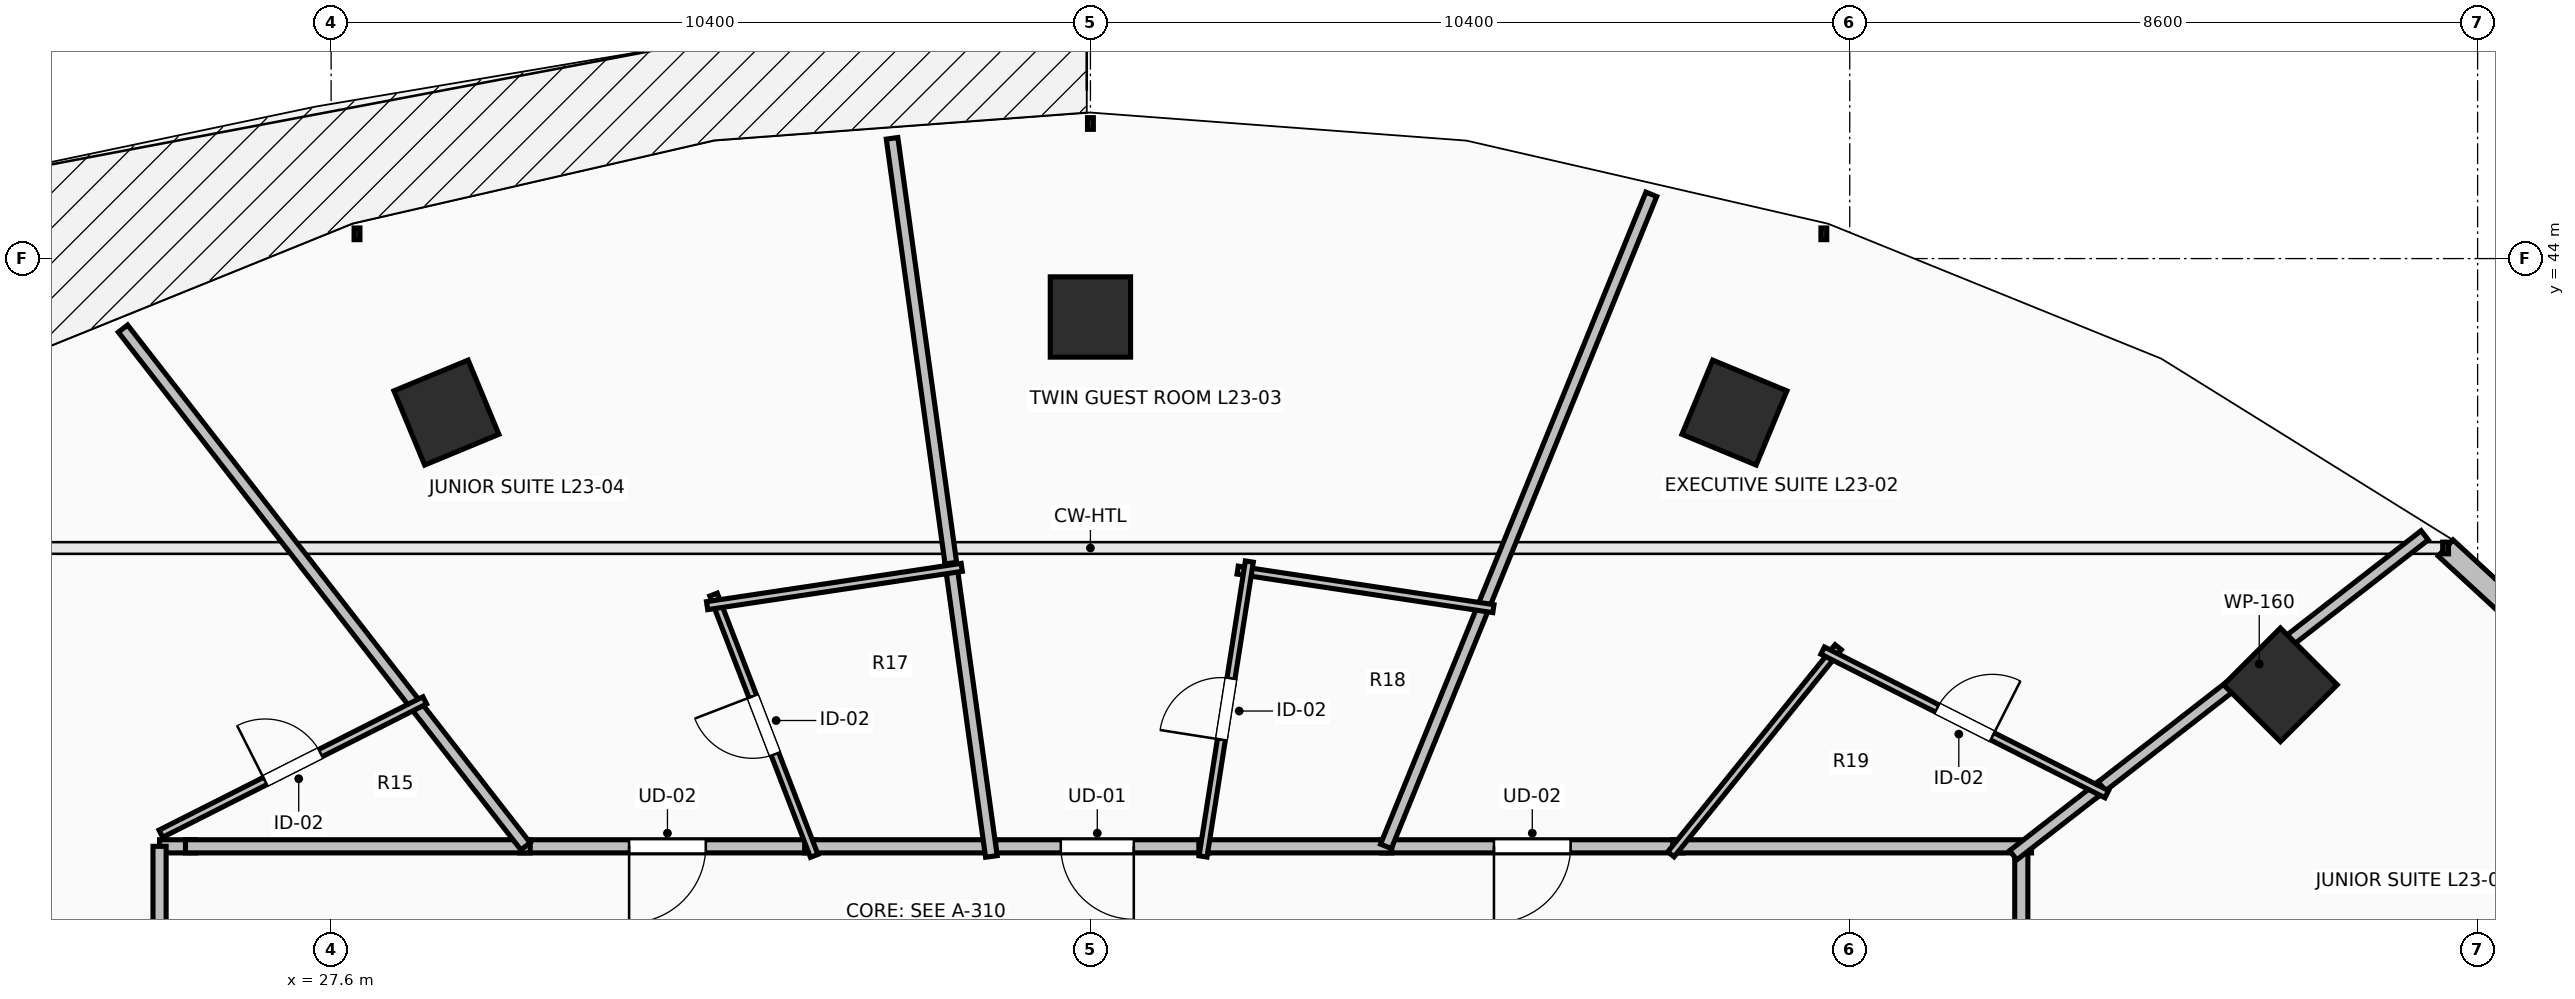
"""IFC4 building model, lengths in metres.
Left out: names, types, materials, properties, quantities, classifications, styles, units other than length and angle.
Written with IfcOpenShell. Run it as: python <this file> out.ifc"""

import sys

from ifc_helpers import new_model, si_unit, direction, frame, frame_2d, origin, origin_2d, place, context, subcontext, project, spatial, rectangle, extrude, element, fill, save


model = new_model("IFC4")
c1 = context("Model", 3, precision=1e-05, world=origin(), true_north=direction((0.0, 1.0)))
c2 = subcontext(c1, "Body", "Model", "MODEL_VIEW")
j1 = project(units=[si_unit("LENGTHUNIT", "METRE"), si_unit("PLANEANGLEUNIT", "RADIAN")], contexts=[c1])
p1 = place(None, origin())
s1 = spatial("IfcSite", under=j1, at=p1, CompositionType="ELEMENT")
p2 = place(p1, origin())
s2 = spatial("IfcBuilding", under=s1, at=p2, CompositionType="ELEMENT")
p3 = place(p2, frame((0.0, 0.0, 89.3)))
s3 = spatial("IfcBuildingStorey", under=s2, at=p3, CompositionType="ELEMENT", Elevation=89.3)
for number, where, z_axis, x_axis in (
    (1, (54.299, 38.162, 0.0), (0.0, 0.0, 1.0), (0.707, 0.707, 0.0)),
    (2, (46.821, 41.891, 0.0), (0.0, 0.0, 1.0), (0.383, 0.924, 0.0)),
    (3, (38.0, 43.2, 0.0), (0.0, 0.0, 1.0), (0.0, 1.0, 0.0)),
    (4, (29.179, 41.891, 0.0), (0.0, 0.0, 1.0), (-0.383, 0.924, 0.0)),
):
    element("IfcColumn", number, at=place(p3, frame(where, z_axis=z_axis, x_axis=x_axis)), inside=s3, PredefinedType="COLUMN", context=c2, shape_type="SweptSolid", body=[
        extrude(rectangle(XDim=1.1, YDim=1.1, at=origin_2d()), origin(), (0.0, 0.0, 1.0), 3.5),
    ])
p4 = place(p3, frame((59.826, 37.028, 0.0), z_axis=(0.0, 0.0, 1.0), x_axis=(-0.735416718093, 0.677615119924, 0.0)))
e5 = element("IfcWall", 5, at=p4, inside=s3, PredefinedType="STANDARD", context=c2, shape_type="SweptSolid", body=[
    extrude(rectangle(XDim=4.439, YDim=0.3, at=frame_2d((2.22, 0.0))), origin(), (0.0, 0.0, 1.0), 3.24),
])
p5 = place(p4, frame((1.32, 0.0, 0.85)))
e6 = element("IfcOpeningElement", 6, at=p5, cuts=e5, PredefinedType="OPENING", context=c2, shape_type="SweptSolid", body=[
    extrude(rectangle(XDim=1.8, YDim=2.19, at=frame_2d((0.9, 1.095))), frame((0.0, 0.165, 0.0), z_axis=(0.0, -1.0, 0.0), x_axis=(1.0, 0.0, 0.0)), (0.0, 0.0, 1.0), 0.33),
])
p6 = place(p3, frame((50.75, 30.853, 0.0), z_axis=(0.0, 0.0, 1.0), x_axis=(0.0, 1.0, 0.0)))
e7 = element("IfcWall", 7, at=p6, inside=s3, PredefinedType="PARTITIONING", context=c2, shape_type="SweptSolid", body=[
    extrude(rectangle(XDim=5.097, YDim=0.18, at=frame_2d((2.548, 0.0))), origin(), (0.0, 0.0, 1.0), 2.432),
])
p7 = place(p6, frame((2.023, 0.0, 0.0)))
e8 = element("IfcOpeningElement", 8, at=p7, cuts=e7, PredefinedType="OPENING", context=c2, shape_type="SweptSolid", body=[
    extrude(rectangle(XDim=1.05, YDim=2.2, at=frame_2d((0.525, 1.1))), frame((0.0, 0.105, 0.0), z_axis=(0.0, -1.0, 0.0), x_axis=(1.0, 0.0, 0.0)), (0.0, 0.0, 1.0), 0.21),
])
p8 = place(p3, frame((46.116, 35.95, 0.0), z_axis=(0.0, 0.0, 1.0), x_axis=(-1.0, 0.0, 0.0)))
e9 = element("IfcWall", 9, at=p8, inside=s3, PredefinedType="PARTITIONING", context=c2, shape_type="SweptSolid", body=[
    extrude(rectangle(XDim=4.128, YDim=0.18, at=frame_2d((2.064, 0.0))), origin(), (0.0, 0.0, 1.0), 2.972),
])
p9 = place(p8, frame((1.539, 0.0, 0.0)))
e10 = element("IfcOpeningElement", 10, at=p9, cuts=e9, PredefinedType="OPENING", context=c2, shape_type="SweptSolid", body=[
    extrude(rectangle(XDim=1.05, YDim=2.2, at=frame_2d((0.525, 1.1))), frame((0.0, 0.105, 0.0), z_axis=(0.0, -1.0, 0.0), x_axis=(1.0, 0.0, 0.0)), (0.0, 0.0, 1.0), 0.21),
])
p10 = place(p3, frame((50.89, 35.95, 0.0), z_axis=(0.0, 0.0, 1.0), x_axis=(-1.0, 0.0, 0.0)))
e11 = element("IfcWall", 11, at=p10, inside=s3, PredefinedType="PARTITIONING", context=c2, shape_type="SweptSolid", body=[
    extrude(rectangle(XDim=4.914, YDim=0.18, at=frame_2d((2.457, 0.0))), origin(), (0.0, 0.0, 1.0), 2.432),
])
p11 = place(p3, frame((39.625, 35.95, 0.0), z_axis=(0.0, 0.0, 1.0), x_axis=(-1.0, 0.0, 0.0)))
e12 = element("IfcWall", 12, at=p11, inside=s3, PredefinedType="PARTITIONING", context=c2, shape_type="SweptSolid", body=[
    extrude(rectangle(XDim=3.062, YDim=0.18, at=frame_2d((1.531, 0.0))), origin(), (0.0, 0.0, 1.0), 2.972),
])
p12 = place(p11, frame((1.031, 0.0, 0.0)))
e13 = element("IfcOpeningElement", 13, at=p12, cuts=e12, PredefinedType="OPENING", context=c2, shape_type="SweptSolid", body=[
    extrude(rectangle(XDim=1.0, YDim=2.15, at=frame_2d((0.5, 1.075))), frame((0.0, 0.105, 0.0), z_axis=(0.0, -1.0, 0.0), x_axis=(1.0, 0.0, 0.0)), (0.0, 0.0, 1.0), 0.21),
])
p13 = place(p3, frame((42.128, 35.95, 0.0), z_axis=(0.0, 0.0, 1.0), x_axis=(-1.0, 0.0, 0.0)))
e14 = element("IfcWall", 14, at=p13, inside=s3, PredefinedType="PARTITIONING", context=c2, shape_type="SweptSolid", body=[
    extrude(rectangle(XDim=2.643, YDim=0.18, at=frame_2d((1.321, 0.0))), origin(), (0.0, 0.0, 1.0), 2.972),
])
p14 = place(p3, frame((34.226, 35.95, 0.0), z_axis=(0.0, 0.0, 1.0), x_axis=(-1.0, 0.0, 0.0)))
e15 = element("IfcWall", 15, at=p14, inside=s3, PredefinedType="PARTITIONING", context=c2, shape_type="SweptSolid", body=[
    extrude(rectangle(XDim=4.039, YDim=0.18, at=frame_2d((2.02, 0.0))), origin(), (0.0, 0.0, 1.0), 2.432),
])
p15 = place(p14, frame((1.494, 0.0, 0.0)))
e16 = element("IfcOpeningElement", 16, at=p15, cuts=e15, PredefinedType="OPENING", context=c2, shape_type="SweptSolid", body=[
    extrude(rectangle(XDim=1.05, YDim=2.2, at=frame_2d((0.525, 1.1))), frame((0.0, 0.105, 0.0), z_axis=(0.0, -1.0, 0.0), x_axis=(1.0, 0.0, 0.0)), (0.0, 0.0, 1.0), 0.21),
])
p16 = place(p3, frame((36.703, 35.95, 0.0), z_axis=(0.0, 0.0, 1.0), x_axis=(-1.0, 0.0, 0.0)))
e17 = element("IfcWall", 17, at=p16, inside=s3, PredefinedType="PARTITIONING", context=c2, shape_type="SweptSolid", body=[
    extrude(rectangle(XDim=2.617, YDim=0.18, at=frame_2d((1.309, 0.0))), origin(), (0.0, 0.0, 1.0), 2.972),
])
p17 = place(p3, frame((25.745, 35.95, 0.0), z_axis=(0.0, 0.0, 1.0), x_axis=(-1.0, 0.0, 0.0)))
e18 = element("IfcWall", 18, at=p17, inside=s3, PredefinedType="PARTITIONING", context=c2, shape_type="SweptSolid", body=[
    extrude(rectangle(XDim=0.495, YDim=0.18, at=frame_2d((0.248, 0.0))), origin(), (0.0, 0.0, 1.0), 3.24),
])
p18 = place(p3, frame((25.25, 35.95, 0.0), z_axis=(0.0, 0.0, 1.0), x_axis=(0.0, -1.0, 0.0)))
e19 = element("IfcWall", 19, at=p18, inside=s3, PredefinedType="PARTITIONING", context=c2, shape_type="SweptSolid", body=[
    extrude(rectangle(XDim=4.822, YDim=0.18, at=frame_2d((2.411, 0.0))), origin(), (0.0, 0.0, 1.0), 2.432),
])
p19 = place(p18, frame((1.886, 0.0, 0.0)))
e20 = element("IfcOpeningElement", 20, at=p19, cuts=e19, PredefinedType="OPENING", context=c2, shape_type="SweptSolid", body=[
    extrude(rectangle(XDim=1.05, YDim=2.2, at=frame_2d((0.525, 1.1))), frame((0.0, 0.105, 0.0), z_axis=(0.0, -1.0, 0.0), x_axis=(1.0, 0.0, 0.0)), (0.0, 0.0, 1.0), 0.21),
])
p20 = place(p3, frame((30.327, 35.95, 0.0), z_axis=(0.0, 0.0, 1.0), x_axis=(-1.0, 0.0, 0.0)))
e21 = element("IfcWall", 21, at=p20, inside=s3, PredefinedType="PARTITIONING", context=c2, shape_type="SweptSolid", body=[
    extrude(rectangle(XDim=4.722, YDim=0.18, at=frame_2d((2.361, 0.0))), origin(), (0.0, 0.0, 1.0), 2.432),
])
p21 = place(p3, frame((56.275, 40.21, 0.0), z_axis=(0.0, 0.0, 1.0), x_axis=(-0.78943235806, -0.613837561614, 0.0)))
e22 = element("IfcWall", 22, at=p21, inside=s3, PredefinedType="PARTITIONING", context=c2, shape_type="SweptSolid", body=[
    extrude(rectangle(XDim=5.741, YDim=0.16, at=frame_2d((2.87, 0.0))), origin(), (0.0, 0.0, 1.0), 2.677),
])
p22 = place(p3, frame((51.854, 36.772, 0.0), z_axis=(0.0, 0.0, 1.0), x_axis=(-0.789420593357, -0.613852691436, 0.0)))
e23 = element("IfcWall", 23, at=p22, inside=s3, PredefinedType="PARTITIONING", context=c2, shape_type="SweptSolid", body=[
    extrude(rectangle(XDim=1.538, YDim=0.16, at=frame_2d((0.769, 0.0))), origin(), (0.0, 0.0, 1.0), 2.922),
])
p23 = place(p3, frame((45.951, 35.841, 0.0), z_axis=(0.0, 0.0, 1.0), x_axis=(0.628411924203, 0.77788074505, 0.0)))
e24 = element("IfcWall", 24, at=p23, inside=s3, PredefinedType="PARTITIONING", context=c2, shape_type="SweptSolid", body=[
    extrude(rectangle(XDim=3.646, YDim=0.11, at=frame_2d((1.823, 0.0))), origin(), (0.0, 0.0, 1.0), 2.432),
])
p24 = place(p3, frame((48.029, 38.631, 0.0), z_axis=(0.0, 0.0, 1.0), x_axis=(0.892459125519, -0.451128262558, 0.0)))
e25 = element("IfcWall", 25, at=p24, inside=s3, PredefinedType="PARTITIONING", context=c2, shape_type="SweptSolid", body=[
    extrude(rectangle(XDim=4.361, YDim=0.11, at=frame_2d((2.18, 0.0))), origin(), (0.0, 0.0, 1.0), 3.24),
])
p25 = place(p24, frame((1.755, 0.0, 0.0)))
e26 = element("IfcOpeningElement", 26, at=p25, cuts=e25, PredefinedType="OPENING", context=c2, shape_type="SweptSolid", body=[
    extrude(rectangle(XDim=0.85, YDim=2.1, at=frame_2d((0.425, 1.05))), frame((0.0, 0.07, 0.0), z_axis=(0.0, -1.0, 0.0), x_axis=(1.0, 0.0, 0.0)), (0.0, 0.0, 1.0), 0.14),
])
p26 = place(p3, frame((45.682, 44.88, 0.0), z_axis=(0.0, 0.0, 1.0), x_axis=(-0.376911553655, -0.9262492541, 0.0)))
e27 = element("IfcWall", 27, at=p26, inside=s3, PredefinedType="PARTITIONING", context=c2, shape_type="SweptSolid", body=[
    extrude(rectangle(XDim=9.641, YDim=0.16, at=frame_2d((4.82, 0.0))), origin(), (0.0, 0.0, 1.0), 2.677),
])
p27 = place(p3, frame((40.017, 39.733, 0.0), z_axis=(0.0, 0.0, 1.0), x_axis=(0.988835521732, -0.149011110196, 0.0)))
e28 = element("IfcWall", 28, at=p27, inside=s3, PredefinedType="PARTITIONING", context=c2, shape_type="SweptSolid", body=[
    extrude(rectangle(XDim=3.542, YDim=0.11, at=frame_2d((1.771, 0.0))), origin(), (0.0, 0.0, 1.0), 3.24),
])
p28 = place(p3, frame((39.542, 35.812, 0.0), z_axis=(0.0, 0.0, 1.0), x_axis=(0.155211191462, 0.98788131172, 0.0)))
e29 = element("IfcWall", 29, at=p28, inside=s3, PredefinedType="PARTITIONING", context=c2, shape_type="SweptSolid", body=[
    extrude(rectangle(XDim=4.088, YDim=0.11, at=frame_2d((2.044, 0.0))), origin(), (0.0, 0.0, 1.0), 2.922),
])
p29 = place(p28, frame((1.619, 0.0, 0.0)))
e30 = element("IfcOpeningElement", 30, at=p29, cuts=e29, PredefinedType="OPENING", context=c2, shape_type="SweptSolid", body=[
    extrude(rectangle(XDim=0.85, YDim=2.1, at=frame_2d((0.425, 1.05))), frame((0.0, 0.07, 0.0), z_axis=(0.0, -1.0, 0.0), x_axis=(1.0, 0.0, 0.0)), (0.0, 0.0, 1.0), 0.14),
])
p30 = place(p3, frame((35.283, 45.647, 0.0), z_axis=(0.0, 0.0, 1.0), x_axis=(0.137015172239, -0.990568948926, 0.0)))
e31 = element("IfcWall", 31, at=p30, inside=s3, PredefinedType="PARTITIONING", context=c2, shape_type="SweptSolid", body=[
    extrude(rectangle(XDim=6.014, YDim=0.16, at=frame_2d((3.007, 0.0))), origin(), (0.0, 0.0, 1.0), 2.432),
])
p31 = place(p3, frame((36.087, 39.829, 0.0), z_axis=(0.0, 0.0, 1.0), x_axis=(0.137071274589, -0.990561187248, 0.0)))
e32 = element("IfcWall", 32, at=p31, inside=s3, PredefinedType="PARTITIONING", context=c2, shape_type="SweptSolid", body=[
    extrude(rectangle(XDim=4.056, YDim=0.16, at=frame_2d((2.028, 0.0))), origin(), (0.0, 0.0, 1.0), 2.922),
])
p32 = place(p3, frame((34.216, 35.819, 0.0), z_axis=(0.0, 0.0, 1.0), x_axis=(-0.359516562862, 0.933138704067, 0.0)))
e33 = element("IfcWall", 33, at=p32, inside=s3, PredefinedType="PARTITIONING", context=c2, shape_type="SweptSolid", body=[
    extrude(rectangle(XDim=3.835, YDim=0.11, at=frame_2d((1.917, 0.0))), origin(), (0.0, 0.0, 1.0), 2.432),
])
p33 = place(p32, frame((1.492, 0.0, 0.0)))
e34 = element("IfcOpeningElement", 34, at=p33, cuts=e33, PredefinedType="OPENING", context=c2, shape_type="SweptSolid", body=[
    extrude(rectangle(XDim=0.85, YDim=2.1, at=frame_2d((0.425, 1.05))), frame((0.0, 0.07, 0.0), z_axis=(0.0, -1.0, 0.0), x_axis=(1.0, 0.0, 0.0)), (0.0, 0.0, 1.0), 0.14),
])
p34 = place(p3, frame((32.75, 39.246, 0.0), z_axis=(0.0, 0.0, 1.0), x_axis=(0.988874324222, 0.148753389525, 0.0)))
e35 = element("IfcWall", 35, at=p34, inside=s3, PredefinedType="PARTITIONING", context=c2, shape_type="SweptSolid", body=[
    extrude(rectangle(XDim=3.527, YDim=0.11, at=frame_2d((1.764, 0.0))), origin(), (0.0, 0.0, 1.0), 2.432),
])
p35 = place(p3, frame((24.749, 43.041, 0.0), z_axis=(0.0, 0.0, 1.0), x_axis=(0.61384652665, -0.789425387051, 0.0)))
e36 = element("IfcWall", 36, at=p35, inside=s3, PredefinedType="PARTITIONING", context=c2, shape_type="SweptSolid", body=[
    extrude(rectangle(XDim=8.983, YDim=0.16, at=frame_2d((4.491, 0.0))), origin(), (0.0, 0.0, 1.0), 2.432),
])
p36 = place(p3, frame((25.268, 36.123, 0.0), z_axis=(0.0, 0.0, 1.0), x_axis=(0.892501687321, 0.451044053425, 0.0)))
e37 = element("IfcWall", 37, at=p36, inside=s3, PredefinedType="PARTITIONING", context=c2, shape_type="SweptSolid", body=[
    extrude(rectangle(XDim=4.049, YDim=0.11, at=frame_2d((2.025, 0.0))), origin(), (0.0, 0.0, 1.0), 2.432),
])
p37 = place(p36, frame((1.6, 0.0, 0.0)))
e38 = element("IfcOpeningElement", 38, at=p37, cuts=e37, PredefinedType="OPENING", context=c2, shape_type="SweptSolid", body=[
    extrude(rectangle(XDim=0.85, YDim=2.1, at=frame_2d((0.425, 1.05))), frame((0.0, 0.07, 0.0), z_axis=(0.0, -1.0, 0.0), x_axis=(1.0, 0.0, 0.0)), (0.0, 0.0, 1.0), 0.14),
])
p38 = place(p3, frame((14.997, 35.359, 0.0), z_axis=(0.0, 0.0, 1.0), x_axis=(0.926288615834, -0.376814808861, 0.0)))
e39 = element("IfcWall", 39, at=p38, inside=s3, PredefinedType="PARTITIONING", context=c2, shape_type="SweptSolid", body=[
    extrude(rectangle(XDim=11.069, YDim=0.16, at=frame_2d((5.534, 0.0))), origin(), (0.0, 0.0, 1.0), 2.677),
])
p39 = place(p9, origin())
e40 = element("IfcDoor", 40, at=p39, inside=s3, OperationType="SINGLE_SWING_RIGHT", PredefinedType="DOOR", context=c2, shape_type="SweptSolid", body=[
    extrude(rectangle(XDim=1.05, YDim=2.2, at=frame_2d((0.525, 1.1))), frame((0.0, 0.025, 0.0), z_axis=(0.0, -1.0, 0.0), x_axis=(1.0, 0.0, 0.0)), (0.0, 0.0, 1.0), 0.05),
])
fill(e10, e40)
p40 = place(p12, origin())
e41 = element("IfcDoor", 41, at=p40, inside=s3, OperationType="SINGLE_SWING_LEFT", PredefinedType="DOOR", context=c2, shape_type="SweptSolid", body=[
    extrude(rectangle(XDim=1.0, YDim=2.15, at=frame_2d((0.5, 1.075))), frame((0.0, 0.025, 0.0), z_axis=(0.0, -1.0, 0.0), x_axis=(1.0, 0.0, 0.0)), (0.0, 0.0, 1.0), 0.05),
])
fill(e13, e41)
p41 = place(p15, origin())
e42 = element("IfcDoor", 42, at=p41, inside=s3, OperationType="SINGLE_SWING_RIGHT", PredefinedType="DOOR", context=c2, shape_type="SweptSolid", body=[
    extrude(rectangle(XDim=1.05, YDim=2.2, at=frame_2d((0.525, 1.1))), frame((0.0, 0.025, 0.0), z_axis=(0.0, -1.0, 0.0), x_axis=(1.0, 0.0, 0.0)), (0.0, 0.0, 1.0), 0.05),
])
fill(e16, e42)
p42 = place(p25, origin())
e43 = element("IfcDoor", 43, at=p42, inside=s3, OperationType="SINGLE_SWING_RIGHT", PredefinedType="DOOR", context=c2, shape_type="SweptSolid", body=[
    extrude(rectangle(XDim=0.85, YDim=2.1, at=frame_2d((0.425, 1.05))), frame((0.0, 0.025, 0.0), z_axis=(0.0, -1.0, 0.0), x_axis=(1.0, 0.0, 0.0)), (0.0, 0.0, 1.0), 0.05),
])
fill(e26, e43)
p43 = place(p29, origin())
e44 = element("IfcDoor", 44, at=p43, inside=s3, OperationType="SINGLE_SWING_LEFT", PredefinedType="DOOR", context=c2, shape_type="SweptSolid", body=[
    extrude(rectangle(XDim=0.85, YDim=2.1, at=frame_2d((0.425, 1.05))), frame((0.0, 0.025, 0.0), z_axis=(0.0, -1.0, 0.0), x_axis=(1.0, 0.0, 0.0)), (0.0, 0.0, 1.0), 0.05),
])
fill(e30, e44)
p44 = place(p33, origin())
e45 = element("IfcDoor", 45, at=p44, inside=s3, OperationType="SINGLE_SWING_RIGHT", PredefinedType="DOOR", context=c2, shape_type="SweptSolid", body=[
    extrude(rectangle(XDim=0.85, YDim=2.1, at=frame_2d((0.425, 1.05))), frame((0.0, 0.025, 0.0), z_axis=(0.0, -1.0, 0.0), x_axis=(1.0, 0.0, 0.0)), (0.0, 0.0, 1.0), 0.05),
])
fill(e34, e45)
p45 = place(p37, origin())
e46 = element("IfcDoor", 46, at=p45, inside=s3, OperationType="SINGLE_SWING_LEFT", PredefinedType="DOOR", context=c2, shape_type="SweptSolid", body=[
    extrude(rectangle(XDim=0.85, YDim=2.1, at=frame_2d((0.425, 1.05))), frame((0.0, 0.025, 0.0), z_axis=(0.0, -1.0, 0.0), x_axis=(1.0, 0.0, 0.0)), (0.0, 0.0, 1.0), 0.05),
])
fill(e38, e46)
save(model, sys.argv[1])
